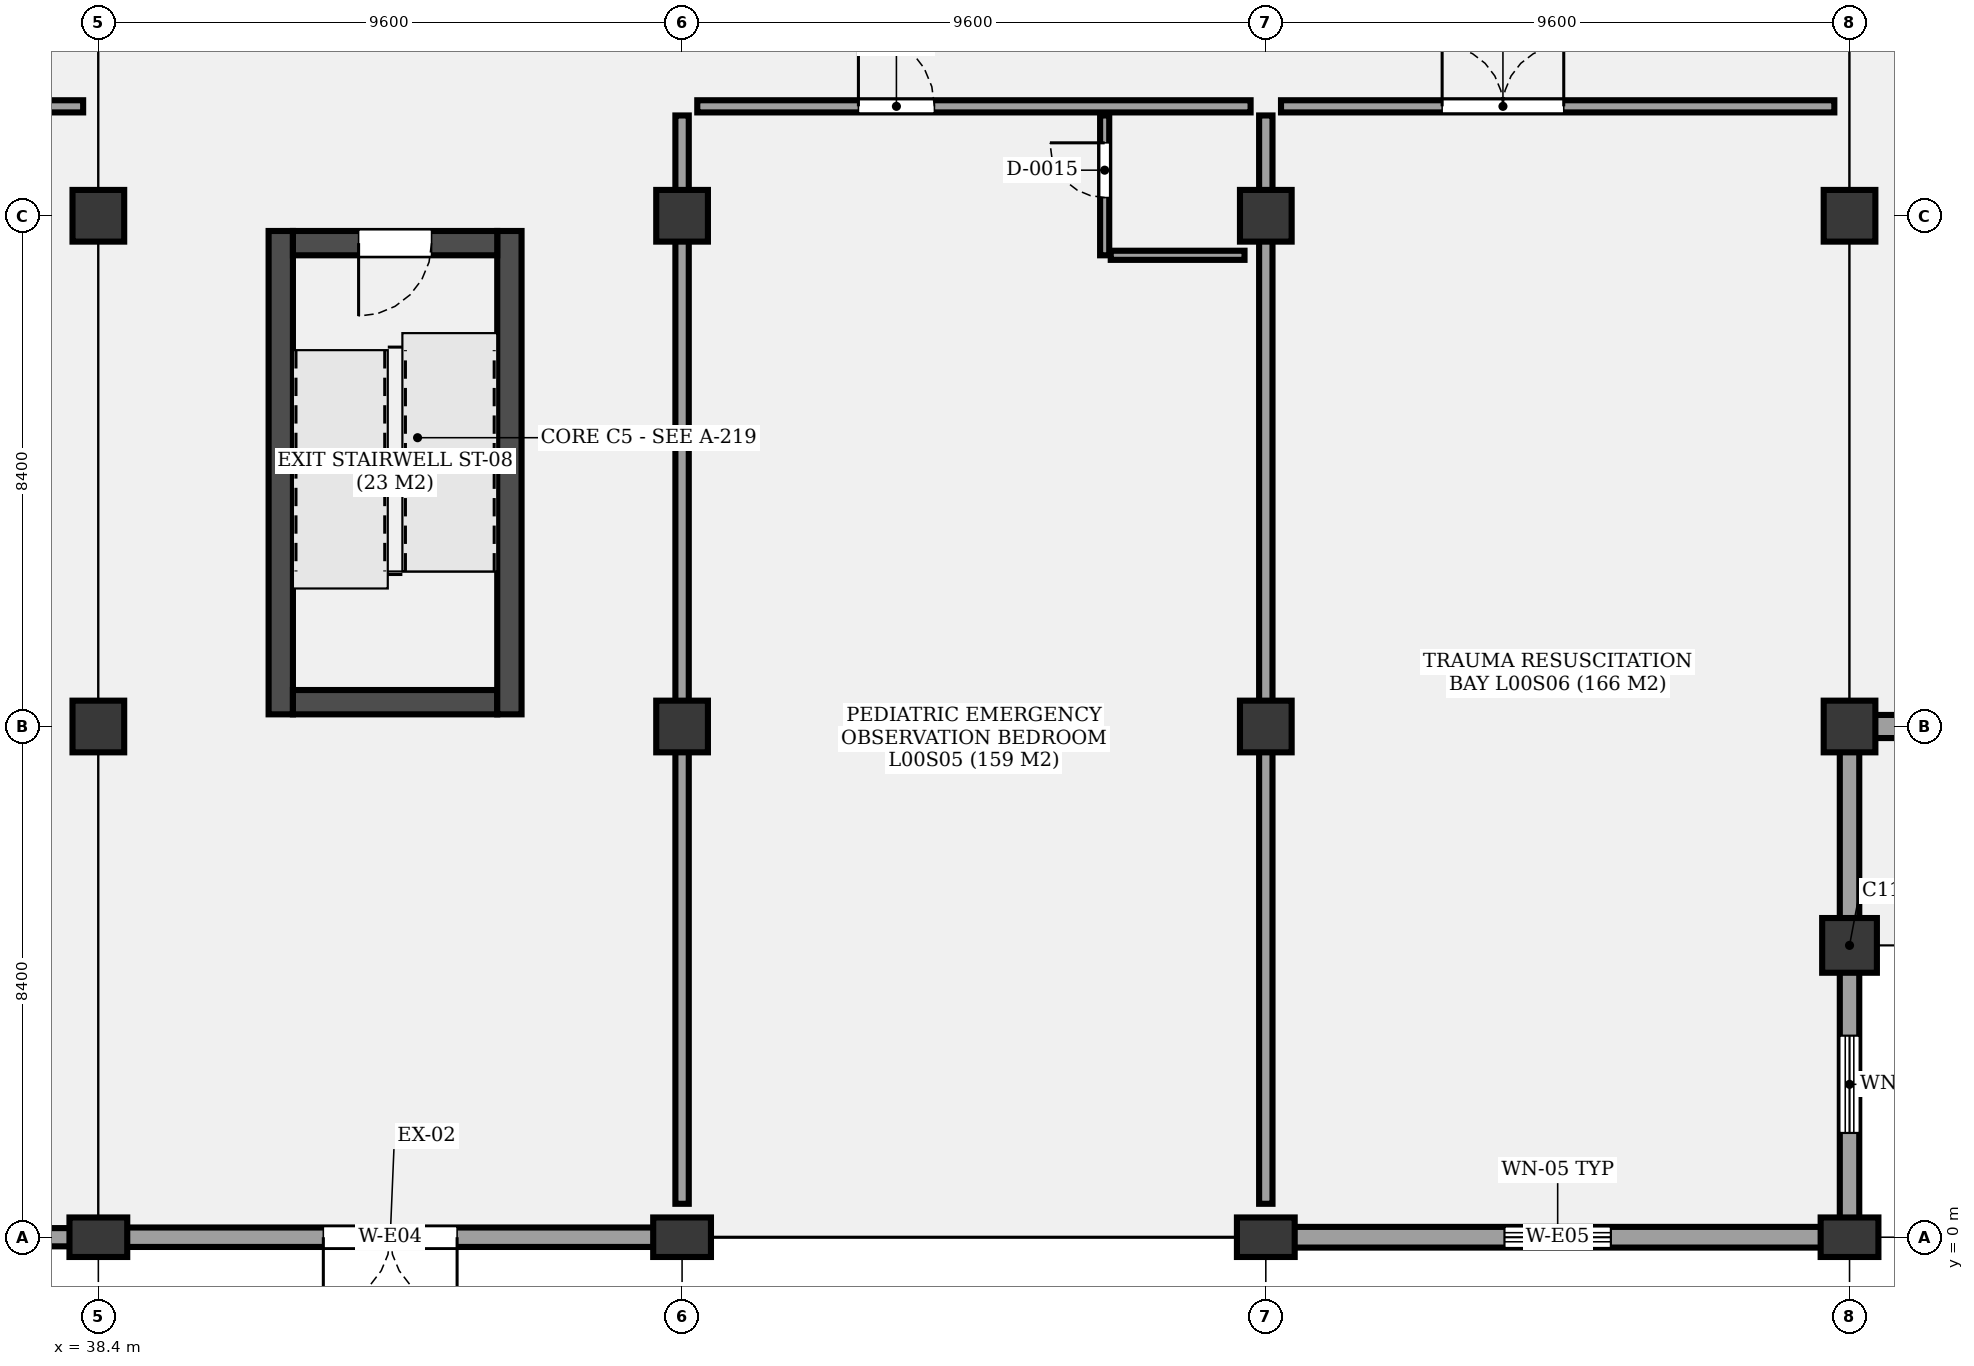
"""IFC4 building model, lengths in metres.
Left out: names, types, materials, properties, quantities, classifications, styles, units other than length and angle.
Written with IfcOpenShell. Run it as: python <this file> out.ifc"""

import sys

from ifc_helpers import new_model, si_unit, direction, frame, frame_2d, origin, origin_2d, place, context, subcontext, project, spatial, rectangle, circle, extrude, element, fill, save


model = new_model("IFC4")
c1 = context("Model", 3, precision=1e-05, world=origin(), true_north=direction((0.0, 1.0)))
c2 = subcontext(c1, "Body", "Model", "MODEL_VIEW")
j1 = project(units=[si_unit("LENGTHUNIT", "METRE"), si_unit("PLANEANGLEUNIT", "RADIAN")], contexts=[c1])
p1 = place(None, origin())
s1 = spatial("IfcSite", under=j1, at=p1, CompositionType="ELEMENT")
p2 = place(p1, origin())
s2 = spatial("IfcBuilding", under=s1, at=p2, CompositionType="ELEMENT")
p3 = place(p2, origin())
s3 = spatial("IfcBuildingStorey", under=s2, at=p3, CompositionType="ELEMENT", Elevation=0.0)
p4 = place(p3, frame((38.4, 0.0, -0.35), z_axis=(0.0, 0.0, 1.0), x_axis=(0.0, 1.0, 0.0)))
e1 = element("IfcColumn", 1, at=p4, inside=s3, PredefinedType="COLUMN", context=c2, shape_type="SweptSolid", body=[
    extrude(rectangle(XDim=0.95, YDim=0.65, at=origin_2d()), origin(), (0.0, 0.0, 1.0), 5.45),
])
for number, where, z_axis, x_axis in (
    (2, (38.4, 8.4, -0.35), (0.0, 0.0, 1.0), (1.0, 0.0, 0.0)),
    (3, (38.4, 16.8, -0.35), (0.0, 0.0, 1.0), (1.0, 0.0, 0.0)),
):
    element("IfcColumn", number, at=place(p3, frame(where, z_axis=z_axis, x_axis=x_axis)), inside=s3, PredefinedType="COLUMN", context=c2, shape_type="SweptSolid", body=[
        extrude(rectangle(XDim=0.85, YDim=0.85, at=origin_2d()), origin(), (0.0, 0.0, 1.0), 5.45),
    ])
p5 = place(p3, frame((48.0, 0.0, -0.35), z_axis=(0.0, 0.0, 1.0), x_axis=(0.0, 1.0, 0.0)))
e4 = element("IfcColumn", 4, at=p5, inside=s3, PredefinedType="COLUMN", context=c2, shape_type="SweptSolid", body=[
    extrude(rectangle(XDim=0.95, YDim=0.65, at=origin_2d()), origin(), (0.0, 0.0, 1.0), 5.45),
])
for number, where, z_axis, x_axis in (
    (5, (48.0, 8.4, -0.35), (0.0, 0.0, 1.0), (1.0, 0.0, 0.0)),
    (6, (48.0, 16.8, -0.35), (0.0, 0.0, 1.0), (1.0, 0.0, 0.0)),
):
    element("IfcColumn", number, at=place(p3, frame(where, z_axis=z_axis, x_axis=x_axis)), inside=s3, PredefinedType="COLUMN", context=c2, shape_type="SweptSolid", body=[
        extrude(rectangle(XDim=0.85, YDim=0.85, at=origin_2d()), origin(), (0.0, 0.0, 1.0), 5.45),
    ])
p6 = place(p3, frame((57.6, 0.0, -0.35), z_axis=(0.0, 0.0, 1.0), x_axis=(0.0, 1.0, 0.0)))
e7 = element("IfcColumn", 7, at=p6, inside=s3, PredefinedType="COLUMN", context=c2, shape_type="SweptSolid", body=[
    extrude(rectangle(XDim=0.95, YDim=0.65, at=origin_2d()), origin(), (0.0, 0.0, 1.0), 5.45),
])
for number, where, z_axis, x_axis in (
    (8, (57.6, 8.4, -0.35), (0.0, 0.0, 1.0), (1.0, 0.0, 0.0)),
    (9, (57.6, 16.8, -0.35), (0.0, 0.0, 1.0), (1.0, 0.0, 0.0)),
):
    element("IfcColumn", number, at=place(p3, frame(where, z_axis=z_axis, x_axis=x_axis)), inside=s3, PredefinedType="COLUMN", context=c2, shape_type="SweptSolid", body=[
        extrude(rectangle(XDim=0.85, YDim=0.85, at=origin_2d()), origin(), (0.0, 0.0, 1.0), 5.45),
    ])
p7 = place(p3, frame((67.2, 0.0, -0.35), z_axis=(0.0, 0.0, 1.0), x_axis=(0.0, 1.0, 0.0)))
e10 = element("IfcColumn", 10, at=p7, inside=s3, PredefinedType="COLUMN", context=c2, shape_type="SweptSolid", body=[
    extrude(rectangle(XDim=0.95, YDim=0.65, at=origin_2d()), origin(), (0.0, 0.0, 1.0), 5.45),
])
p8 = place(p3, frame((67.2, 4.8, -0.35), z_axis=(0.0, 0.0, 1.0), x_axis=(1.0, 0.0, 0.0)))
e11 = element("IfcColumn", 11, at=p8, inside=s3, PredefinedType="COLUMN", context=c2, shape_type="SweptSolid", body=[
    extrude(circle(Radius=0.45, at=origin_2d()), origin(), (0.0, 0.0, 1.0), 5.45),
])
for number, where, z_axis, x_axis in (
    (12, (67.2, 8.4, -0.35), (0.0, 0.0, 1.0), (1.0, 0.0, 0.0)),
    (13, (67.2, 16.8, -0.35), (0.0, 0.0, 1.0), (1.0, 0.0, 0.0)),
):
    element("IfcColumn", number, at=place(p3, frame(where, z_axis=z_axis, x_axis=x_axis)), inside=s3, PredefinedType="COLUMN", context=c2, shape_type="SweptSolid", body=[
        extrude(rectangle(XDim=0.85, YDim=0.85, at=origin_2d()), origin(), (0.0, 0.0, 1.0), 5.45),
    ])
p9 = place(p3, frame((41.4, 16.55, 0.0), z_axis=(0.0, 0.0, 1.0), x_axis=(0.0, -1.0, 0.0)))
e14 = element("IfcWall", 14, at=p9, inside=s3, PredefinedType="SHEAR", context=c2, shape_type="SweptSolid", body=[
    extrude(rectangle(XDim=7.95, YDim=0.4, at=frame_2d((3.975, 0.0))), origin(), (0.0, 0.0, 1.0), 5.1),
])
p10 = place(p3, frame((41.6, 8.8, 0.0), z_axis=(0.0, 0.0, 1.0), x_axis=(1.0, 0.0, 0.0)))
e15 = element("IfcWall", 15, at=p10, inside=s3, PredefinedType="SHEAR", context=c2, shape_type="SweptSolid", body=[
    extrude(rectangle(XDim=3.36, YDim=0.4, at=frame_2d((1.68, 0.0))), origin(), (0.0, 0.0, 1.0), 5.1),
])
p11 = place(p3, frame((45.16, 8.6, 0.0), z_axis=(0.0, 0.0, 1.0), x_axis=(0.0, 1.0, 0.0)))
e16 = element("IfcWall", 16, at=p11, inside=s3, PredefinedType="SHEAR", context=c2, shape_type="SweptSolid", body=[
    extrude(rectangle(XDim=7.95, YDim=0.4, at=frame_2d((3.975, 0.0))), origin(), (0.0, 0.0, 1.0), 5.1),
])
p12 = place(p3, frame((44.96, 16.35, 0.0), z_axis=(0.0, 0.0, 1.0), x_axis=(-1.0, 0.0, 0.0)))
e17 = element("IfcWall", 17, at=p12, inside=s3, PredefinedType="SHEAR", context=c2, shape_type="SweptSolid", body=[
    extrude(rectangle(XDim=3.36, YDim=0.4, at=frame_2d((1.68, 0.0))), origin(), (0.0, 0.0, 1.0), 5.1),
])
p13 = place(p12, frame((1.08, 0.0, 0.0)))
e18 = element("IfcOpeningElement", 18, at=p13, cuts=e17, PredefinedType="OPENING", context=c2, shape_type="SweptSolid", body=[
    extrude(rectangle(XDim=1.2, YDim=2.2, at=frame_2d((0.6, 1.1))), frame((0.0, 0.21, 0.0), z_axis=(0.0, -1.0, 0.0), x_axis=(1.0, 0.0, 0.0)), (0.0, 0.0, 1.0), 0.42),
])
p14 = place(p3, frame((38.4, 0.0, 0.0), z_axis=(0.0, 0.0, 1.0), x_axis=(-1.0, 0.0, 0.0)))
e19 = element("IfcWall", 19, at=p14, inside=s3, PredefinedType="SOLIDWALL", context=c2, shape_type="SweptSolid", body=[
    extrude(rectangle(XDim=9.6, YDim=0.3, at=frame_2d((4.8, 0.0))), origin(), (0.0, 0.0, 1.0), 4.24),
])
p15 = place(p14, frame((3.7, 0.0, 0.0)))
e20 = element("IfcOpeningElement", 20, at=p15, cuts=e19, PredefinedType="OPENING", context=c2, shape_type="SweptSolid", body=[
    extrude(rectangle(XDim=2.2, YDim=2.5, at=frame_2d((1.1, 1.25))), frame((0.0, 0.16, 0.0), z_axis=(0.0, -1.0, 0.0), x_axis=(1.0, 0.0, 0.0)), (0.0, 0.0, 1.0), 0.32),
])
p16 = place(p3, frame((48.0, 0.0, 0.0), z_axis=(0.0, 0.0, 1.0), x_axis=(-1.0, 0.0, 0.0)))
e21 = element("IfcWall", 21, at=p16, inside=s3, PredefinedType="SOLIDWALL", context=c2, shape_type="SweptSolid", body=[
    extrude(rectangle(XDim=9.6, YDim=0.32, at=frame_2d((4.8, 0.0))), origin(), (0.0, 0.0, 1.0), 4.24),
])
p17 = place(p16, frame((3.7, 0.0, 0.0)))
e22 = element("IfcOpeningElement", 22, at=p17, cuts=e21, PredefinedType="OPENING", context=c2, shape_type="SweptSolid", body=[
    extrude(rectangle(XDim=2.2, YDim=2.5, at=frame_2d((1.1, 1.25))), frame((0.0, 0.17, 0.0), z_axis=(0.0, -1.0, 0.0), x_axis=(1.0, 0.0, 0.0)), (0.0, 0.0, 1.0), 0.34),
])
p18 = place(p3, frame((67.2, 0.0, 0.0), z_axis=(0.0, 0.0, 1.0), x_axis=(-1.0, 0.0, 0.0)))
e23 = element("IfcWall", 23, at=p18, inside=s3, PredefinedType="SOLIDWALL", context=c2, shape_type="SweptSolid", body=[
    extrude(rectangle(XDim=9.6, YDim=0.34, at=frame_2d((4.8, 0.0))), origin(), (0.0, 0.0, 1.0), 4.24),
])
p19 = place(p18, frame((3.925, 0.0, 0.85)))
e24 = element("IfcOpeningElement", 24, at=p19, cuts=e23, PredefinedType="OPENING", context=c2, shape_type="SweptSolid", body=[
    extrude(rectangle(XDim=1.75, YDim=1.2, at=frame_2d((0.875, 0.6))), frame((0.0, 0.18, 0.0), z_axis=(0.0, -1.0, 0.0), x_axis=(1.0, 0.0, 0.0)), (0.0, 0.0, 1.0), 0.36),
])
p20 = place(p3, frame((76.8, 8.4, 0.0), z_axis=(0.0, 0.0, 1.0), x_axis=(-1.0, 0.0, 0.0)))
e25 = element("IfcWall", 25, at=p20, inside=s3, PredefinedType="SOLIDWALL", context=c2, shape_type="SweptSolid", body=[
    extrude(rectangle(XDim=9.6, YDim=0.38, at=frame_2d((4.8, 0.0))), origin(), (0.0, 0.0, 1.0), 4.24),
])
p21 = place(p20, frame((2.6, 0.0, 0.0)))
e26 = element("IfcOpeningElement", 26, at=p21, cuts=e25, PredefinedType="OPENING", context=c2, shape_type="SweptSolid", body=[
    extrude(rectangle(XDim=2.6, YDim=2.6, at=frame_2d((1.3, 1.3))), frame((0.0, 0.2, 0.0), z_axis=(0.0, -1.0, 0.0), x_axis=(1.0, 0.0, 0.0)), (0.0, 0.0, 1.0), 0.4),
])
p22 = place(p3, frame((67.2, 8.24, 0.0), z_axis=(0.0, 0.0, 1.0), x_axis=(0.0, -1.0, 0.0)))
e27 = element("IfcWall", 27, at=p22, inside=s3, PredefinedType="SOLIDWALL", context=c2, shape_type="SweptSolid", body=[
    extrude(rectangle(XDim=8.08, YDim=0.32, at=frame_2d((4.04, 0.0))), origin(), (0.0, 0.0, 1.0), 4.24),
])
p23 = place(p22, frame((4.925, 0.0, 0.85)))
e28 = element("IfcOpeningElement", 28, at=p23, cuts=e27, PredefinedType="OPENING", context=c2, shape_type="SweptSolid", body=[
    extrude(rectangle(XDim=1.6, YDim=1.4, at=frame_2d((0.8, 0.7))), frame((0.0, 0.17, 0.0), z_axis=(0.0, -1.0, 0.0), x_axis=(1.0, 0.0, 0.0)), (0.0, 0.0, 1.0), 0.34),
])
p24 = place(p3, frame((29.05, 18.6, 0.0), z_axis=(0.0, 0.0, 1.0), x_axis=(1.0, 0.0, 0.0)))
e29 = element("IfcWall", 29, at=p24, inside=s3, PredefinedType="PARTITIONING", context=c2, shape_type="SweptSolid", body=[
    extrude(rectangle(XDim=9.1, YDim=0.2, at=frame_2d((4.55, 0.0))), origin(), (0.0, 0.0, 1.0), 3.98),
])
p25 = place(p24, frame((2.65, 0.0, 0.0)))
e30 = element("IfcOpeningElement", 30, at=p25, cuts=e29, PredefinedType="OPENING", context=c2, shape_type="SweptSolid", body=[
    extrude(rectangle(XDim=1.35, YDim=2.4, at=frame_2d((0.675, 1.2))), frame((0.0, 0.11, 0.0), z_axis=(0.0, -1.0, 0.0), x_axis=(1.0, 0.0, 0.0)), (0.0, 0.0, 1.0), 0.22),
])
p26 = place(p3, frame((48.25, 18.6, 0.0), z_axis=(0.0, 0.0, 1.0), x_axis=(1.0, 0.0, 0.0)))
e31 = element("IfcWall", 31, at=p26, inside=s3, PredefinedType="PARTITIONING", context=c2, shape_type="SweptSolid", body=[
    extrude(rectangle(XDim=9.1, YDim=0.2, at=frame_2d((4.55, 0.0))), origin(), (0.0, 0.0, 1.0), 3.98),
])
p27 = place(p26, frame((2.65, 0.0, 0.0)))
e32 = element("IfcOpeningElement", 32, at=p27, cuts=e31, PredefinedType="OPENING", context=c2, shape_type="SweptSolid", body=[
    extrude(rectangle(XDim=1.25, YDim=2.2, at=frame_2d((0.625, 1.1))), frame((0.0, 0.11, 0.0), z_axis=(0.0, -1.0, 0.0), x_axis=(1.0, 0.0, 0.0)), (0.0, 0.0, 1.0), 0.22),
])
p28 = place(p3, frame((54.95, 16.15, 0.0), z_axis=(0.0, 0.0, 1.0), x_axis=(0.0, 1.0, 0.0)))
e33 = element("IfcWall", 33, at=p28, inside=s3, PredefinedType="PARTITIONING", context=c2, shape_type="SweptSolid", body=[
    extrude(rectangle(XDim=2.3, YDim=0.15, at=frame_2d((1.15, 0.0))), origin(), (0.0, 0.0, 1.0), 3.98),
])
p29 = place(p28, frame((0.95, 0.0, 0.0)))
e34 = element("IfcOpeningElement", 34, at=p29, cuts=e33, PredefinedType="OPENING", context=c2, shape_type="SweptSolid", body=[
    extrude(rectangle(XDim=0.9, YDim=2.1, at=frame_2d((0.45, 1.05))), frame((0.0, 0.085, 0.0), z_axis=(0.0, -1.0, 0.0), x_axis=(1.0, 0.0, 0.0)), (0.0, 0.0, 1.0), 0.17),
])
p30 = place(p3, frame((55.05, 16.15, 0.0), z_axis=(0.0, 0.0, 1.0), x_axis=(1.0, 0.0, 0.0)))
e35 = element("IfcWall", 35, at=p30, inside=s3, PredefinedType="PARTITIONING", context=c2, shape_type="SweptSolid", body=[
    extrude(rectangle(XDim=2.2, YDim=0.15, at=frame_2d((1.1, 0.0))), origin(), (0.0, 0.0, 1.0), 3.98),
])
p31 = place(p3, frame((48.0, 0.55, 0.0), z_axis=(0.0, 0.0, 1.0), x_axis=(0.0, 1.0, 0.0)))
e36 = element("IfcWall", 36, at=p31, inside=s3, PredefinedType="PARTITIONING", context=c2, shape_type="SweptSolid", body=[
    extrude(rectangle(XDim=17.9, YDim=0.22, at=frame_2d((8.95, 0.0))), origin(), (0.0, 0.0, 1.0), 3.98),
])
p32 = place(p3, frame((57.85, 18.6, 0.0), z_axis=(0.0, 0.0, 1.0), x_axis=(1.0, 0.0, 0.0)))
e37 = element("IfcWall", 37, at=p32, inside=s3, PredefinedType="PARTITIONING", context=c2, shape_type="SweptSolid", body=[
    extrude(rectangle(XDim=9.1, YDim=0.2, at=frame_2d((4.55, 0.0))), origin(), (0.0, 0.0, 1.0), 3.98),
])
p33 = place(p32, frame((2.65, 0.0, 0.0)))
e38 = element("IfcOpeningElement", 38, at=p33, cuts=e37, PredefinedType="OPENING", context=c2, shape_type="SweptSolid", body=[
    extrude(rectangle(XDim=2.0, YDim=2.4, at=frame_2d((1.0, 1.2))), frame((0.0, 0.11, 0.0), z_axis=(0.0, -1.0, 0.0), x_axis=(1.0, 0.0, 0.0)), (0.0, 0.0, 1.0), 0.22),
])
p34 = place(p3, frame((57.6, 0.55, 0.0), z_axis=(0.0, 0.0, 1.0), x_axis=(0.0, 1.0, 0.0)))
e39 = element("IfcWall", 39, at=p34, inside=s3, PredefinedType="PARTITIONING", context=c2, shape_type="SweptSolid", body=[
    extrude(rectangle(XDim=17.9, YDim=0.22, at=frame_2d((8.95, 0.0))), origin(), (0.0, 0.0, 1.0), 3.98),
])
p35 = place(p13, origin())
e40 = element("IfcDoor", 40, at=p35, inside=s3, OperationType="SINGLE_SWING_RIGHT", PredefinedType="DOOR", context=c2, shape_type="SweptSolid", body=[
    extrude(rectangle(XDim=1.2, YDim=2.2, at=frame_2d((0.6, 1.1))), frame((0.0, 0.025, 0.0), z_axis=(0.0, -1.0, 0.0), x_axis=(1.0, 0.0, 0.0)), (0.0, 0.0, 1.0), 0.05),
])
fill(e18, e40)
p36 = place(p17, origin())
e41 = element("IfcDoor", 41, at=p36, inside=s3, OperationType="DOUBLE_DOOR_SINGLE_SWING", PredefinedType="DOOR", context=c2, shape_type="SweptSolid", body=[
    extrude(rectangle(XDim=2.2, YDim=2.5, at=frame_2d((1.1, 1.25))), frame((0.0, 0.025, 0.0), z_axis=(0.0, -1.0, 0.0), x_axis=(1.0, 0.0, 0.0)), (0.0, 0.0, 1.0), 0.05),
])
fill(e22, e41)
p37 = place(p19, origin())
e42 = element("IfcWindow", 42, at=p37, inside=s3, PartitioningType="SINGLE_PANEL", PredefinedType="WINDOW", context=c2, shape_type="SweptSolid", body=[
    extrude(rectangle(XDim=1.75, YDim=1.2, at=frame_2d((0.875, 0.6))), frame((0.0, 0.03, 0.0), z_axis=(0.0, -1.0, 0.0), x_axis=(1.0, 0.0, 0.0)), (0.0, 0.0, 1.0), 0.06),
])
fill(e24, e42)
p38 = place(p23, origin())
e43 = element("IfcWindow", 43, at=p38, inside=s3, PartitioningType="SINGLE_PANEL", PredefinedType="WINDOW", context=c2, shape_type="SweptSolid", body=[
    extrude(rectangle(XDim=1.6, YDim=1.4, at=frame_2d((0.8, 0.7))), frame((0.0, 0.03, 0.0), z_axis=(0.0, -1.0, 0.0), x_axis=(1.0, 0.0, 0.0)), (0.0, 0.0, 1.0), 0.06),
])
fill(e28, e43)
p39 = place(p27, origin())
e44 = element("IfcDoor", 44, at=p39, inside=s3, OperationType="SINGLE_SWING_LEFT", PredefinedType="DOOR", context=c2, shape_type="SweptSolid", body=[
    extrude(rectangle(XDim=1.25, YDim=2.2, at=frame_2d((0.625, 1.1))), frame((0.0, 0.025, 0.0), z_axis=(0.0, -1.0, 0.0), x_axis=(1.0, 0.0, 0.0)), (0.0, 0.0, 1.0), 0.05),
])
fill(e32, e44)
p40 = place(p29, origin())
e45 = element("IfcDoor", 45, at=p40, inside=s3, OperationType="SINGLE_SWING_RIGHT", PredefinedType="DOOR", context=c2, shape_type="SweptSolid", body=[
    extrude(rectangle(XDim=0.9, YDim=2.1, at=frame_2d((0.45, 1.05))), frame((0.0, 0.025, 0.0), z_axis=(0.0, -1.0, 0.0), x_axis=(1.0, 0.0, 0.0)), (0.0, 0.0, 1.0), 0.05),
])
fill(e34, e45)
p41 = place(p33, origin())
e46 = element("IfcDoor", 46, at=p41, inside=s3, OperationType="DOUBLE_DOOR_SINGLE_SWING", PredefinedType="DOOR", context=c2, shape_type="SweptSolid", body=[
    extrude(rectangle(XDim=2.0, YDim=2.4, at=frame_2d((1.0, 1.2))), frame((0.0, 0.025, 0.0), z_axis=(0.0, -1.0, 0.0), x_axis=(1.0, 0.0, 0.0)), (0.0, 0.0, 1.0), 0.05),
])
fill(e38, e46)
save(model, sys.argv[1])
